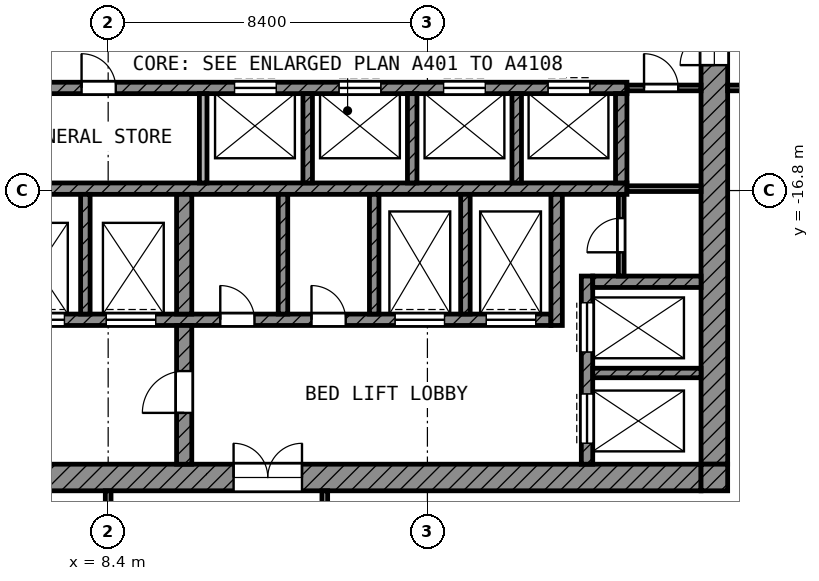
"""IFC4 building model, lengths in metres.
Left out: names, types, materials, properties, quantities, classifications, styles, units other than length and angle.
Written with IfcOpenShell. Run it as: python <this file> out.ifc"""

import sys

from ifc_helpers import new_model, si_unit, direction, frame, frame_2d, origin, place, context, subcontext, project, spatial, rectangle, extrude, element, fill, save


model = new_model("IFC4")
c1 = context("Model", 3, precision=1e-05, world=origin(), true_north=direction((0.0, 1.0)))
c2 = subcontext(c1, "Body", "Model", "MODEL_VIEW")
j1 = project(units=[si_unit("LENGTHUNIT", "METRE"), si_unit("PLANEANGLEUNIT", "RADIAN")], contexts=[c1])
p1 = place(None, origin())
s1 = spatial("IfcSite", under=j1, at=p1, CompositionType="ELEMENT")
p2 = place(p1, origin())
s2 = spatial("IfcBuilding", under=s1, at=p2, CompositionType="ELEMENT")
p3 = place(p2, frame((0.0, 0.0, 302.8)))
s3 = spatial("IfcBuildingStorey", under=s2, at=p3, CompositionType="ELEMENT", Elevation=302.8)
p4 = place(p3, frame((24.35, -24.0, 0.0), z_axis=(0.0, 0.0, 1.0), x_axis=(0.0, 1.0, 0.0)))
e1 = element("IfcWall", 1, at=p4, inside=s3, PredefinedType="SHEAR", context=c2, shape_type="SweptSolid", body=[
    extrude(rectangle(XDim=18.6, YDim=0.7, at=frame_2d((9.3, 0.0))), origin(), (0.0, 0.0, 1.0), 3.6),
])
p5 = place(p4, frame((10.5, 0.0, 0.0)))
e2 = element("IfcOpeningElement", 2, at=p5, cuts=e1, PredefinedType="OPENING", context=c2, shape_type="SweptSolid", body=[
    extrude(rectangle(XDim=1.8, YDim=2.1, at=frame_2d((0.9, 1.05))), frame((0.0, 0.36, 0.0), z_axis=(0.0, -1.0, 0.0), x_axis=(1.0, 0.0, 0.0)), (0.0, 0.0, 1.0), 0.72),
])
p6 = place(p3, frame((5.4, -24.35, 0.0), z_axis=(0.0, 0.0, 1.0), x_axis=(1.0, 0.0, 0.0)))
e3 = element("IfcWall", 3, at=p6, inside=s3, PredefinedType="SHEAR", context=c2, shape_type="SweptSolid", body=[
    extrude(rectangle(XDim=18.6, YDim=0.7, at=frame_2d((9.3, 0.0))), origin(), (0.0, 0.0, 1.0), 3.6),
])
p7 = place(p6, frame((6.3, 0.0, 0.0)))
e4 = element("IfcOpeningElement", 4, at=p7, cuts=e3, PredefinedType="OPENING", context=c2, shape_type="SweptSolid", body=[
    extrude(rectangle(XDim=1.8, YDim=2.1, at=frame_2d((0.9, 1.05))), frame((0.0, 0.36, 0.0), z_axis=(0.0, -1.0, 0.0), x_axis=(1.0, 0.0, 0.0)), (0.0, 0.0, 1.0), 0.72),
])
p8 = place(p3, frame((24.35, -24.7, 0.0), z_axis=(0.0, 0.0, 1.0), x_axis=(0.0, 1.0, 0.0)))
e5 = element("IfcWall", 5, at=p8, inside=s3, PredefinedType="SHEAR", context=c2, shape_type="SweptSolid", body=[
    extrude(rectangle(XDim=0.7, YDim=0.7, at=frame_2d((0.35, 0.0))), origin(), (0.0, 0.0, 1.0), 3.6),
])
p9 = place(p3, frame((5.4, -14.1, 0.0), z_axis=(0.0, 0.0, 1.0), x_axis=(1.0, 0.0, 0.0)))
e6 = element("IfcWall", 6, at=p9, inside=s3, PredefinedType="SHEAR", context=c2, shape_type="SweptSolid", body=[
    extrude(rectangle(XDim=16.65, YDim=0.3, at=frame_2d((8.325, 0.0))), origin(), (0.0, 0.0, 1.0), 3.6),
])
p10 = place(p9, frame((6.325, 0.0, 0.0)))
e7 = element("IfcOpeningElement", 7, at=p10, cuts=e6, PredefinedType="OPENING", context=c2, shape_type="SweptSolid", body=[
    extrude(rectangle(XDim=1.1, YDim=2.1, at=frame_2d((0.55, 1.05))), frame((0.0, 0.16, 0.0), z_axis=(0.0, -1.0, 0.0), x_axis=(1.0, 0.0, 0.0)), (0.0, 0.0, 1.0), 0.32),
])
p11 = place(p9, frame((9.075, 0.0, 0.0)))
e8 = element("IfcOpeningElement", 8, at=p11, cuts=e6, PredefinedType="OPENING", context=c2, shape_type="SweptSolid", body=[
    extrude(rectangle(XDim=1.1, YDim=2.1, at=frame_2d((0.55, 1.05))), frame((0.0, 0.16, 0.0), z_axis=(0.0, -1.0, 0.0), x_axis=(1.0, 0.0, 0.0)), (0.0, 0.0, 1.0), 0.32),
])
p12 = place(p9, frame((11.825, 0.0, 0.0)))
e9 = element("IfcOpeningElement", 9, at=p12, cuts=e6, PredefinedType="OPENING", context=c2, shape_type="SweptSolid", body=[
    extrude(rectangle(XDim=1.1, YDim=2.1, at=frame_2d((0.55, 1.05))), frame((0.0, 0.16, 0.0), z_axis=(0.0, -1.0, 0.0), x_axis=(1.0, 0.0, 0.0)), (0.0, 0.0, 1.0), 0.32),
])
p13 = place(p9, frame((14.575, 0.0, 0.0)))
e10 = element("IfcOpeningElement", 10, at=p13, cuts=e6, PredefinedType="OPENING", context=c2, shape_type="SweptSolid", body=[
    extrude(rectangle(XDim=1.1, YDim=2.1, at=frame_2d((0.55, 1.05))), frame((0.0, 0.16, 0.0), z_axis=(0.0, -1.0, 0.0), x_axis=(1.0, 0.0, 0.0)), (0.0, 0.0, 1.0), 0.32),
])
p14 = place(p9, frame((2.3, 0.0, 0.0)))
e11 = element("IfcOpeningElement", 11, at=p14, cuts=e6, PredefinedType="OPENING", context=c2, shape_type="SweptSolid", body=[
    extrude(rectangle(XDim=0.9, YDim=2.1, at=frame_2d((0.45, 1.05))), frame((0.0, 0.16, 0.0), z_axis=(0.0, -1.0, 0.0), x_axis=(1.0, 0.0, 0.0)), (0.0, 0.0, 1.0), 0.32),
])
p15 = place(p3, frame((5.4, -16.75, 0.0), z_axis=(0.0, 0.0, 1.0), x_axis=(1.0, 0.0, 0.0)))
e12 = element("IfcWall", 12, at=p15, inside=s3, PredefinedType="SHEAR", context=c2, shape_type="SweptSolid", body=[
    extrude(rectangle(XDim=16.65, YDim=0.3, at=frame_2d((8.325, 0.0))), origin(), (0.0, 0.0, 1.0), 3.6),
])
p16 = place(p3, frame((5.4, -20.2, 0.0), z_axis=(0.0, 0.0, 1.0), x_axis=(1.0, 0.0, 0.0)))
e13 = element("IfcWall", 13, at=p16, inside=s3, PredefinedType="SHEAR", context=c2, shape_type="SweptSolid", body=[
    extrude(rectangle(XDim=14.65, YDim=0.3, at=frame_2d((7.325, 0.0))), origin(), (0.0, 0.0, 1.0), 3.6),
])
p17 = place(p16, frame((10.55, 0.0, 0.0)))
e14 = element("IfcOpeningElement", 14, at=p17, cuts=e13, PredefinedType="OPENING", context=c2, shape_type="SweptSolid", body=[
    extrude(rectangle(XDim=1.3, YDim=2.1, at=frame_2d((0.65, 1.05))), frame((0.0, 0.16, 0.0), z_axis=(0.0, -1.0, 0.0), x_axis=(1.0, 0.0, 0.0)), (0.0, 0.0, 1.0), 0.32),
])
p18 = place(p16, frame((12.95, 0.0, 0.0)))
e15 = element("IfcOpeningElement", 15, at=p18, cuts=e13, PredefinedType="OPENING", context=c2, shape_type="SweptSolid", body=[
    extrude(rectangle(XDim=1.3, YDim=2.1, at=frame_2d((0.65, 1.05))), frame((0.0, 0.16, 0.0), z_axis=(0.0, -1.0, 0.0), x_axis=(1.0, 0.0, 0.0)), (0.0, 0.0, 1.0), 0.32),
])
p19 = place(p16, frame((0.55, 0.0, 0.0)))
e16 = element("IfcOpeningElement", 16, at=p19, cuts=e13, PredefinedType="OPENING", context=c2, shape_type="SweptSolid", body=[
    extrude(rectangle(XDim=1.3, YDim=2.1, at=frame_2d((0.65, 1.05))), frame((0.0, 0.16, 0.0), z_axis=(0.0, -1.0, 0.0), x_axis=(1.0, 0.0, 0.0)), (0.0, 0.0, 1.0), 0.32),
])
p20 = place(p16, frame((2.95, 0.0, 0.0)))
e17 = element("IfcOpeningElement", 17, at=p20, cuts=e13, PredefinedType="OPENING", context=c2, shape_type="SweptSolid", body=[
    extrude(rectangle(XDim=1.3, YDim=2.1, at=frame_2d((0.65, 1.05))), frame((0.0, 0.16, 0.0), z_axis=(0.0, -1.0, 0.0), x_axis=(1.0, 0.0, 0.0)), (0.0, 0.0, 1.0), 0.32),
])
p21 = place(p16, frame((5.95, 0.0, 0.0)))
e18 = element("IfcOpeningElement", 18, at=p21, cuts=e13, PredefinedType="OPENING", context=c2, shape_type="SweptSolid", body=[
    extrude(rectangle(XDim=0.9, YDim=2.1, at=frame_2d((0.45, 1.05))), frame((0.0, 0.16, 0.0), z_axis=(0.0, -1.0, 0.0), x_axis=(1.0, 0.0, 0.0)), (0.0, 0.0, 1.0), 0.32),
])
p22 = place(p16, frame((8.35, 0.0, 0.0)))
e19 = element("IfcOpeningElement", 19, at=p22, cuts=e13, PredefinedType="OPENING", context=c2, shape_type="SweptSolid", body=[
    extrude(rectangle(XDim=0.9, YDim=2.1, at=frame_2d((0.45, 1.05))), frame((0.0, 0.16, 0.0), z_axis=(0.0, -1.0, 0.0), x_axis=(1.0, 0.0, 0.0)), (0.0, 0.0, 1.0), 0.32),
])
p23 = place(p3, frame((10.4, -24.0, 0.0), z_axis=(0.0, 0.0, 1.0), x_axis=(0.0, 1.0, 0.0)))
e20 = element("IfcWall", 20, at=p23, inside=s3, PredefinedType="SHEAR", context=c2, shape_type="SweptSolid", body=[
    extrude(rectangle(XDim=3.65, YDim=0.4, at=frame_2d((1.825, 0.0))), origin(), (0.0, 0.0, 1.0), 3.6),
])
p24 = place(p23, frame((1.35, 0.0, 0.0)))
e21 = element("IfcOpeningElement", 21, at=p24, cuts=e20, PredefinedType="OPENING", context=c2, shape_type="SweptSolid", body=[
    extrude(rectangle(XDim=1.1, YDim=2.1, at=frame_2d((0.55, 1.05))), frame((0.0, 0.21, 0.0), z_axis=(0.0, -1.0, 0.0), x_axis=(1.0, 0.0, 0.0)), (0.0, 0.0, 1.0), 0.42),
])
p25 = place(p3, frame((10.4, -20.05, 0.0), z_axis=(0.0, 0.0, 1.0), x_axis=(0.0, 1.0, 0.0)))
e22 = element("IfcWall", 22, at=p25, inside=s3, PredefinedType="SHEAR", context=c2, shape_type="SweptSolid", body=[
    extrude(rectangle(XDim=3.15, YDim=0.4, at=frame_2d((1.575, 0.0))), origin(), (0.0, 0.0, 1.0), 3.6),
])
p26 = place(p3, frame((20.2, -20.35, 0.0), z_axis=(0.0, 0.0, 1.0), x_axis=(0.0, 1.0, 0.0)))
e23 = element("IfcWall", 23, at=p26, inside=s3, PredefinedType="SHEAR", context=c2, shape_type="SweptSolid", body=[
    extrude(rectangle(XDim=3.45, YDim=0.3, at=frame_2d((1.725, 0.0))), origin(), (0.0, 0.0, 1.0), 3.6),
])
p27 = place(p3, frame((21.9, -16.6, 0.0), z_axis=(0.0, 0.0, 1.0), x_axis=(0.0, 1.0, 0.0)))
e24 = element("IfcWall", 24, at=p27, inside=s3, PredefinedType="SHEAR", context=c2, shape_type="SweptSolid", body=[
    extrude(rectangle(XDim=2.35, YDim=0.3, at=frame_2d((1.175, 0.0))), origin(), (0.0, 0.0, 1.0), 3.6),
])
p28 = place(p3, frame((21.15, -19.2, 0.0), z_axis=(0.0, 0.0, 1.0), x_axis=(1.0, 0.0, 0.0)))
e25 = element("IfcWall", 25, at=p28, inside=s3, PredefinedType="SHEAR", context=c2, shape_type="SweptSolid", body=[
    extrude(rectangle(XDim=2.85, YDim=0.3, at=frame_2d((1.425, 0.0))), origin(), (0.0, 0.0, 1.0), 3.6),
])
p29 = place(p3, frame((21.0, -24.0, 0.0), z_axis=(0.0, 0.0, 1.0), x_axis=(0.0, 1.0, 0.0)))
e26 = element("IfcWall", 26, at=p29, inside=s3, PredefinedType="SHEAR", context=c2, shape_type="SweptSolid", body=[
    extrude(rectangle(XDim=4.95, YDim=0.3, at=frame_2d((2.475, 0.0))), origin(), (0.0, 0.0, 1.0), 3.6),
])
p30 = place(p29, frame((2.95, 0.0, 0.0)))
e27 = element("IfcOpeningElement", 27, at=p30, cuts=e26, PredefinedType="OPENING", context=c2, shape_type="SweptSolid", body=[
    extrude(rectangle(XDim=1.3, YDim=2.1, at=frame_2d((0.65, 1.05))), frame((0.0, 0.16, 0.0), z_axis=(0.0, -1.0, 0.0), x_axis=(1.0, 0.0, 0.0)), (0.0, 0.0, 1.0), 0.32),
])
p31 = place(p29, frame((0.55, 0.0, 0.0)))
e28 = element("IfcOpeningElement", 28, at=p31, cuts=e26, PredefinedType="OPENING", context=c2, shape_type="SweptSolid", body=[
    extrude(rectangle(XDim=1.3, YDim=2.1, at=frame_2d((0.65, 1.05))), frame((0.0, 0.16, 0.0), z_axis=(0.0, -1.0, 0.0), x_axis=(1.0, 0.0, 0.0)), (0.0, 0.0, 1.0), 0.32),
])
p32 = place(p3, frame((21.15, -21.6, 0.0), z_axis=(0.0, 0.0, 1.0), x_axis=(1.0, 0.0, 0.0)))
e29 = element("IfcWall", 29, at=p32, inside=s3, PredefinedType="SHEAR", context=c2, shape_type="SweptSolid", body=[
    extrude(rectangle(XDim=2.85, YDim=0.25, at=frame_2d((1.425, 0.0))), origin(), (0.0, 0.0, 1.0), 3.6),
])
for number, where, z_axis, x_axis in (
    (30, (7.8, -20.05, 0.0), (0.0, 0.0, 1.0), (0.0, 1.0, 0.0)),
    (31, (13.0, -20.05, 0.0), (0.0, 0.0, 1.0), (0.0, 1.0, 0.0)),
    (32, (15.4, -20.05, 0.0), (0.0, 0.0, 1.0), (0.0, 1.0, 0.0)),
    (33, (17.8, -20.05, 0.0), (0.0, 0.0, 1.0), (0.0, 1.0, 0.0)),
):
    element("IfcWall", number, at=place(p3, frame(where, z_axis=z_axis, x_axis=x_axis)), inside=s3, PredefinedType="SHEAR", context=c2, shape_type="SweptSolid", body=[
        extrude(rectangle(XDim=3.15, YDim=0.25, at=frame_2d((1.575, 0.0))), origin(), (0.0, 0.0, 1.0), 3.6),
    ])
p33 = place(p3, frame((10.9, -16.6, 0.0), z_axis=(0.0, 0.0, 1.0), x_axis=(0.0, 1.0, 0.0)))
e34 = element("IfcWall", 34, at=p33, inside=s3, PredefinedType="PARTITIONING", context=c2, shape_type="SweptSolid", body=[
    extrude(rectangle(XDim=2.35, YDim=0.2, at=frame_2d((1.175, 0.0))), origin(), (0.0, 0.0, 1.0), 3.6),
])
for number, where, z_axis, x_axis in (
    (35, (13.65, -16.6, 0.0), (0.0, 0.0, 1.0), (0.0, 1.0, 0.0)),
    (36, (16.4, -16.6, 0.0), (0.0, 0.0, 1.0), (0.0, 1.0, 0.0)),
    (37, (19.15, -16.6, 0.0), (0.0, 0.0, 1.0), (0.0, 1.0, 0.0)),
):
    element("IfcWall", number, at=place(p3, frame(where, z_axis=z_axis, x_axis=x_axis)), inside=s3, PredefinedType="SHEAR", context=c2, shape_type="SweptSolid", body=[
        extrude(rectangle(XDim=2.35, YDim=0.25, at=frame_2d((1.175, 0.0))), origin(), (0.0, 0.0, 1.0), 3.6),
    ])
p34 = place(p3, frame((21.9, -19.05, 0.0), z_axis=(0.0, 0.0, 1.0), x_axis=(0.0, 1.0, 0.0)))
e38 = element("IfcWall", 38, at=p34, inside=s3, PredefinedType="PARTITIONING", context=c2, shape_type="SweptSolid", body=[
    extrude(rectangle(XDim=2.15, YDim=0.15, at=frame_2d((1.075, 0.0))), origin(), (0.0, 0.0, 1.0), 3.6),
])
p35 = place(p34, frame((0.625, 0.0, 0.0)))
e39 = element("IfcOpeningElement", 39, at=p35, cuts=e38, PredefinedType="OPENING", context=c2, shape_type="SweptSolid", body=[
    extrude(rectangle(XDim=0.9, YDim=2.1, at=frame_2d((0.45, 1.05))), frame((0.0, 0.085, 0.0), z_axis=(0.0, -1.0, 0.0), x_axis=(1.0, 0.0, 0.0)), (0.0, 0.0, 1.0), 0.17),
])
p36 = place(p3, frame((22.05, -16.75, 0.0), z_axis=(0.0, 0.0, 1.0), x_axis=(1.0, 0.0, 0.0)))
e40 = element("IfcWall", 40, at=p36, inside=s3, PredefinedType="PARTITIONING", context=c2, shape_type="SweptSolid", body=[
    extrude(rectangle(XDim=1.95, YDim=0.15, at=frame_2d((0.975, 0.0))), origin(), (0.0, 0.0, 1.0), 3.6),
])
p37 = place(p3, frame((22.05, -14.1, 0.0), z_axis=(0.0, 0.0, 1.0), x_axis=(1.0, 0.0, 0.0)))
e41 = element("IfcWall", 41, at=p37, inside=s3, PredefinedType="PARTITIONING", context=c2, shape_type="SweptSolid", body=[
    extrude(rectangle(XDim=1.95, YDim=0.15, at=frame_2d((0.975, 0.0))), origin(), (0.0, 0.0, 1.0), 3.6),
])
p38 = place(p37, frame((0.45, 0.0, 0.0)))
e42 = element("IfcOpeningElement", 42, at=p38, cuts=e41, PredefinedType="OPENING", context=c2, shape_type="SweptSolid", body=[
    extrude(rectangle(XDim=0.9, YDim=2.1, at=frame_2d((0.45, 1.05))), frame((0.0, 0.085, 0.0), z_axis=(0.0, -1.0, 0.0), x_axis=(1.0, 0.0, 0.0)), (0.0, 0.0, 1.0), 0.17),
])
p39 = place(p3, frame((24.7, -14.1, 0.0), z_axis=(0.0, 0.0, 1.0), x_axis=(1.0, 0.0, 0.0)))
e43 = element("IfcWall", 43, at=p39, inside=s3, PredefinedType="PARTITIONING", context=c2, shape_type="SweptSolid", body=[
    extrude(rectangle(XDim=4.625, YDim=0.15, at=frame_2d((2.312, 0.0))), origin(), (0.0, 0.0, 1.0), 3.6),
])
p40 = place(p39, frame((1.85, 0.0, 0.0)))
e44 = element("IfcOpeningElement", 44, at=p40, cuts=e43, PredefinedType="OPENING", context=c2, shape_type="SweptSolid", body=[
    extrude(rectangle(XDim=1.5, YDim=2.1, at=frame_2d((0.75, 1.05))), frame((0.0, 0.085, 0.0), z_axis=(0.0, -1.0, 0.0), x_axis=(1.0, 0.0, 0.0)), (0.0, 0.0, 1.0), 0.17),
])
p41 = place(p3, frame((8.4, -31.957, 0.0), z_axis=(0.0, 0.0, 1.0), x_axis=(0.0, 1.0, 0.0)))
e45 = element("IfcWall", 45, at=p41, inside=s3, PredefinedType="PARTITIONING", context=c2, shape_type="SweptSolid", body=[
    extrude(rectangle(XDim=7.257, YDim=0.15, at=frame_2d((3.628, 0.0))), origin(), (0.0, 0.0, 1.0), 3.6),
])
p42 = place(p3, frame((14.1, -29.325, 0.0), z_axis=(0.0, 0.0, 1.0), x_axis=(0.0, 1.0, 0.0)))
e46 = element("IfcWall", 46, at=p42, inside=s3, PredefinedType="PARTITIONING", context=c2, shape_type="SweptSolid", body=[
    extrude(rectangle(XDim=4.625, YDim=0.15, at=frame_2d((2.312, 0.0))), origin(), (0.0, 0.0, 1.0), 3.6),
])
p43 = place(p10, origin())
e47 = element("IfcDoor", 47, at=p43, inside=s3, OperationType="DOUBLE_DOOR_SLIDING", PredefinedType="DOOR", context=c2, shape_type="SweptSolid", body=[
    extrude(rectangle(XDim=1.1, YDim=2.1, at=frame_2d((0.55, 1.05))), frame((0.0, 0.025, 0.0), z_axis=(0.0, -1.0, 0.0), x_axis=(1.0, 0.0, 0.0)), (0.0, 0.0, 1.0), 0.05),
])
fill(e7, e47)
p44 = place(p11, origin())
e48 = element("IfcDoor", 48, at=p44, inside=s3, OperationType="DOUBLE_DOOR_SLIDING", PredefinedType="DOOR", context=c2, shape_type="SweptSolid", body=[
    extrude(rectangle(XDim=1.1, YDim=2.1, at=frame_2d((0.55, 1.05))), frame((0.0, 0.025, 0.0), z_axis=(0.0, -1.0, 0.0), x_axis=(1.0, 0.0, 0.0)), (0.0, 0.0, 1.0), 0.05),
])
fill(e8, e48)
p45 = place(p12, origin())
e49 = element("IfcDoor", 49, at=p45, inside=s3, OperationType="DOUBLE_DOOR_SLIDING", PredefinedType="DOOR", context=c2, shape_type="SweptSolid", body=[
    extrude(rectangle(XDim=1.1, YDim=2.1, at=frame_2d((0.55, 1.05))), frame((0.0, 0.025, 0.0), z_axis=(0.0, -1.0, 0.0), x_axis=(1.0, 0.0, 0.0)), (0.0, 0.0, 1.0), 0.05),
])
fill(e9, e49)
p46 = place(p13, origin())
e50 = element("IfcDoor", 50, at=p46, inside=s3, OperationType="DOUBLE_DOOR_SLIDING", PredefinedType="DOOR", context=c2, shape_type="SweptSolid", body=[
    extrude(rectangle(XDim=1.1, YDim=2.1, at=frame_2d((0.55, 1.05))), frame((0.0, 0.025, 0.0), z_axis=(0.0, -1.0, 0.0), x_axis=(1.0, 0.0, 0.0)), (0.0, 0.0, 1.0), 0.05),
])
fill(e10, e50)
p47 = place(p30, origin())
e51 = element("IfcDoor", 51, at=p47, inside=s3, OperationType="DOUBLE_DOOR_SLIDING", PredefinedType="DOOR", context=c2, shape_type="SweptSolid", body=[
    extrude(rectangle(XDim=1.3, YDim=2.1, at=frame_2d((0.65, 1.05))), frame((0.0, 0.025, 0.0), z_axis=(0.0, -1.0, 0.0), x_axis=(1.0, 0.0, 0.0)), (0.0, 0.0, 1.0), 0.05),
])
fill(e27, e51)
p48 = place(p31, origin())
e52 = element("IfcDoor", 52, at=p48, inside=s3, OperationType="DOUBLE_DOOR_SLIDING", PredefinedType="DOOR", context=c2, shape_type="SweptSolid", body=[
    extrude(rectangle(XDim=1.3, YDim=2.1, at=frame_2d((0.65, 1.05))), frame((0.0, 0.025, 0.0), z_axis=(0.0, -1.0, 0.0), x_axis=(1.0, 0.0, 0.0)), (0.0, 0.0, 1.0), 0.05),
])
fill(e28, e52)
p49 = place(p17, origin())
e53 = element("IfcDoor", 53, at=p49, inside=s3, OperationType="DOUBLE_DOOR_SLIDING", PredefinedType="DOOR", context=c2, shape_type="SweptSolid", body=[
    extrude(rectangle(XDim=1.3, YDim=2.1, at=frame_2d((0.65, 1.05))), frame((0.0, 0.025, 0.0), z_axis=(0.0, -1.0, 0.0), x_axis=(1.0, 0.0, 0.0)), (0.0, 0.0, 1.0), 0.05),
])
fill(e14, e53)
p50 = place(p18, origin())
e54 = element("IfcDoor", 54, at=p50, inside=s3, OperationType="DOUBLE_DOOR_SLIDING", PredefinedType="DOOR", context=c2, shape_type="SweptSolid", body=[
    extrude(rectangle(XDim=1.3, YDim=2.1, at=frame_2d((0.65, 1.05))), frame((0.0, 0.025, 0.0), z_axis=(0.0, -1.0, 0.0), x_axis=(1.0, 0.0, 0.0)), (0.0, 0.0, 1.0), 0.05),
])
fill(e15, e54)
p51 = place(p19, origin())
e55 = element("IfcDoor", 55, at=p51, inside=s3, OperationType="DOUBLE_DOOR_SLIDING", PredefinedType="DOOR", context=c2, shape_type="SweptSolid", body=[
    extrude(rectangle(XDim=1.3, YDim=2.1, at=frame_2d((0.65, 1.05))), frame((0.0, 0.025, 0.0), z_axis=(0.0, -1.0, 0.0), x_axis=(1.0, 0.0, 0.0)), (0.0, 0.0, 1.0), 0.05),
])
fill(e16, e55)
p52 = place(p20, origin())
e56 = element("IfcDoor", 56, at=p52, inside=s3, OperationType="DOUBLE_DOOR_SLIDING", PredefinedType="DOOR", context=c2, shape_type="SweptSolid", body=[
    extrude(rectangle(XDim=1.3, YDim=2.1, at=frame_2d((0.65, 1.05))), frame((0.0, 0.025, 0.0), z_axis=(0.0, -1.0, 0.0), x_axis=(1.0, 0.0, 0.0)), (0.0, 0.0, 1.0), 0.05),
])
fill(e17, e56)
p53 = place(p24, origin())
e57 = element("IfcDoor", 57, at=p53, inside=s3, OperationType="SINGLE_SWING_LEFT", PredefinedType="DOOR", context=c2, shape_type="SweptSolid", body=[
    extrude(rectangle(XDim=1.1, YDim=2.1, at=frame_2d((0.55, 1.05))), frame((0.0, 0.025, 0.0), z_axis=(0.0, -1.0, 0.0), x_axis=(1.0, 0.0, 0.0)), (0.0, 0.0, 1.0), 0.05),
])
fill(e21, e57)
p54 = place(p5, origin())
e58 = element("IfcDoor", 58, at=p54, inside=s3, OperationType="DOUBLE_DOOR_SINGLE_SWING", PredefinedType="DOOR", context=c2, shape_type="SweptSolid", body=[
    extrude(rectangle(XDim=1.8, YDim=2.1, at=frame_2d((0.9, 1.05))), frame((0.0, 0.025, 0.0), z_axis=(0.0, -1.0, 0.0), x_axis=(1.0, 0.0, 0.0)), (0.0, 0.0, 1.0), 0.05),
])
fill(e2, e58)
p55 = place(p7, origin())
e59 = element("IfcDoor", 59, at=p55, inside=s3, OperationType="DOUBLE_DOOR_SINGLE_SWING", PredefinedType="DOOR", context=c2, shape_type="SweptSolid", body=[
    extrude(rectangle(XDim=1.8, YDim=2.1, at=frame_2d((0.9, 1.05))), frame((0.0, 0.025, 0.0), z_axis=(0.0, -1.0, 0.0), x_axis=(1.0, 0.0, 0.0)), (0.0, 0.0, 1.0), 0.05),
])
fill(e4, e59)
p56 = place(p38, origin())
e60 = element("IfcDoor", 60, at=p56, inside=s3, OperationType="SINGLE_SWING_LEFT", PredefinedType="DOOR", context=c2, shape_type="SweptSolid", body=[
    extrude(rectangle(XDim=0.9, YDim=2.1, at=frame_2d((0.45, 1.05))), frame((0.0, 0.025, 0.0), z_axis=(0.0, -1.0, 0.0), x_axis=(1.0, 0.0, 0.0)), (0.0, 0.0, 1.0), 0.05),
])
fill(e42, e60)
p57 = place(p35, origin())
e61 = element("IfcDoor", 61, at=p57, inside=s3, OperationType="SINGLE_SWING_LEFT", PredefinedType="DOOR", context=c2, shape_type="SweptSolid", body=[
    extrude(rectangle(XDim=0.9, YDim=2.1, at=frame_2d((0.45, 1.05))), frame((0.0, 0.025, 0.0), z_axis=(0.0, -1.0, 0.0), x_axis=(1.0, 0.0, 0.0)), (0.0, 0.0, 1.0), 0.05),
])
fill(e39, e61)
p58 = place(p21, origin())
e62 = element("IfcDoor", 62, at=p58, inside=s3, OperationType="SINGLE_SWING_LEFT", PredefinedType="DOOR", context=c2, shape_type="SweptSolid", body=[
    extrude(rectangle(XDim=0.9, YDim=2.1, at=frame_2d((0.45, 1.05))), frame((0.0, 0.025, 0.0), z_axis=(0.0, -1.0, 0.0), x_axis=(1.0, 0.0, 0.0)), (0.0, 0.0, 1.0), 0.05),
])
fill(e18, e62)
p59 = place(p22, origin())
e63 = element("IfcDoor", 63, at=p59, inside=s3, OperationType="SINGLE_SWING_LEFT", PredefinedType="DOOR", context=c2, shape_type="SweptSolid", body=[
    extrude(rectangle(XDim=0.9, YDim=2.1, at=frame_2d((0.45, 1.05))), frame((0.0, 0.025, 0.0), z_axis=(0.0, -1.0, 0.0), x_axis=(1.0, 0.0, 0.0)), (0.0, 0.0, 1.0), 0.05),
])
fill(e19, e63)
p60 = place(p14, origin())
e64 = element("IfcDoor", 64, at=p60, inside=s3, OperationType="SINGLE_SWING_LEFT", PredefinedType="DOOR", context=c2, shape_type="SweptSolid", body=[
    extrude(rectangle(XDim=0.9, YDim=2.1, at=frame_2d((0.45, 1.05))), frame((0.0, 0.025, 0.0), z_axis=(0.0, -1.0, 0.0), x_axis=(1.0, 0.0, 0.0)), (0.0, 0.0, 1.0), 0.05),
])
fill(e11, e64)
save(model, sys.argv[1])
